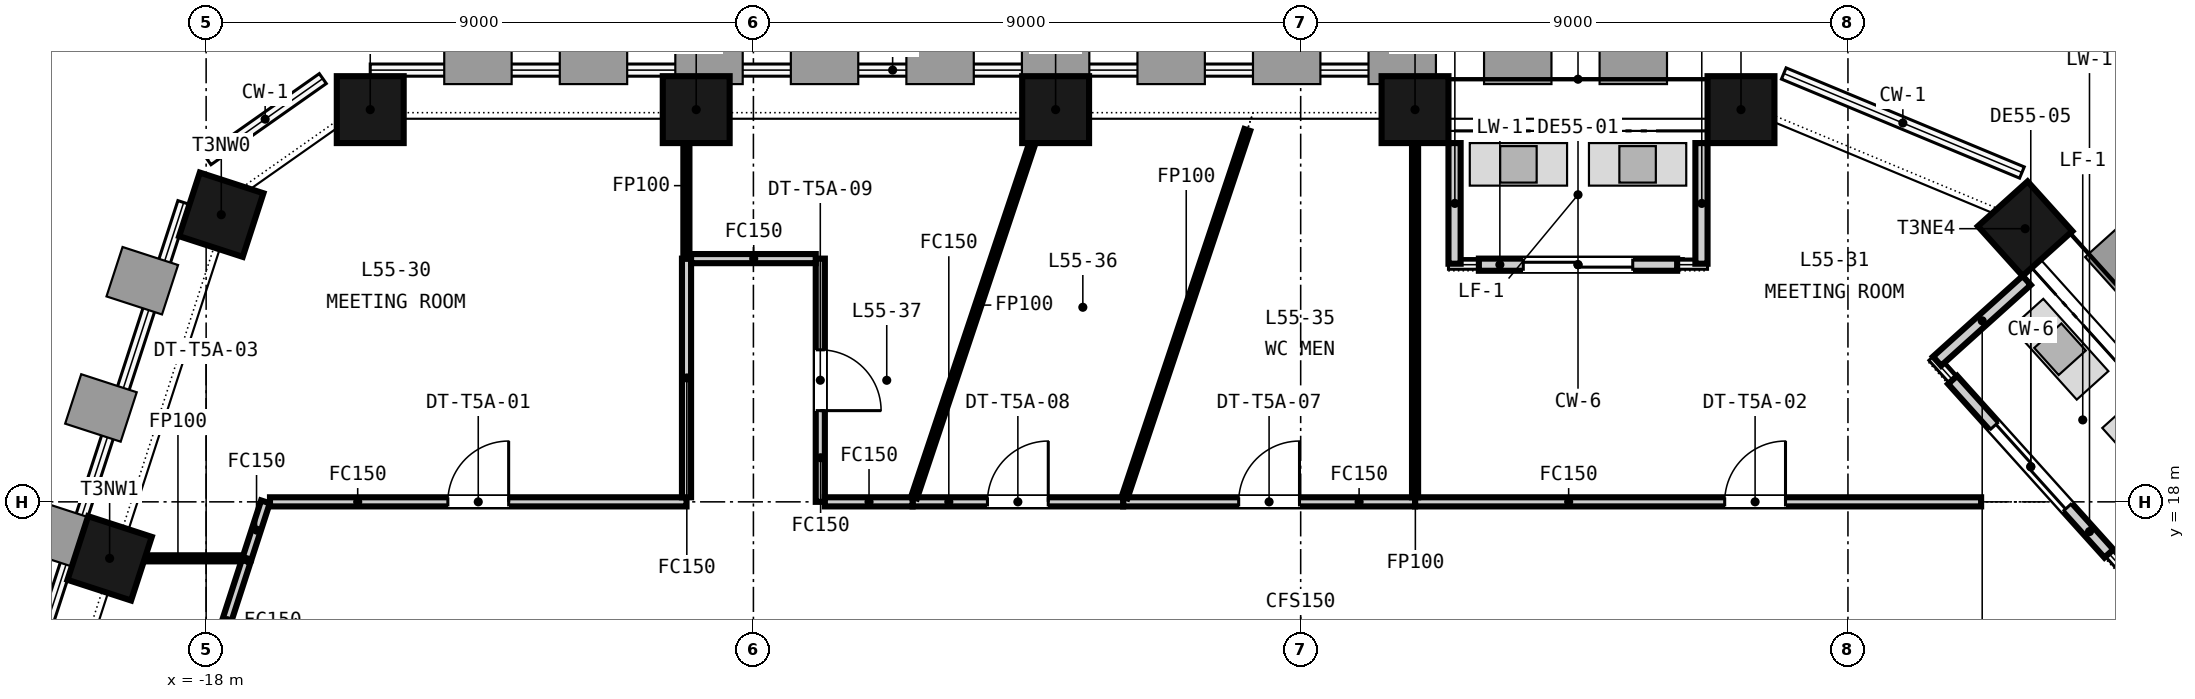
"""IFC4 building model, lengths in metres.
Left out: names, types, materials, properties, quantities, classifications, styles, units other than length and angle.
Written with IfcOpenShell. Run it as: python <this file> out.ifc"""

import sys

from ifc_helpers import new_model, si_unit, direction, frame, frame_2d, origin, origin_2d, place, context, subcontext, project, spatial, rectangle, extrude, element, fill, save


model = new_model("IFC4")
c1 = context("Model", 3, precision=1e-05, world=origin(), true_north=direction((0.0, 1.0)))
c2 = subcontext(c1, "Body", "Model", "MODEL_VIEW")
j1 = project(units=[si_unit("LENGTHUNIT", "METRE"), si_unit("PLANEANGLEUNIT", "RADIAN")], contexts=[c1])
p1 = place(None, origin())
s1 = spatial("IfcSite", under=j1, at=p1, CompositionType="ELEMENT")
p2 = place(p1, origin())
s2 = spatial("IfcBuilding", under=s1, at=p2, CompositionType="ELEMENT")
p3 = place(p2, frame((0.0, 0.0, 219.95)))
s3 = spatial("IfcBuildingStorey", under=s2, at=p3, CompositionType="ELEMENT", Elevation=219.95)
for number, where, z_axis, x_axis in (
    (1, (7.241, 24.45, -0.15), (0.0, 0.0, 1.0), (-1.0, 0.0, 0.0)),
    (2, (1.881, 24.45, -0.15), (0.0, 0.0, 1.0), (-1.0, 0.0, 0.0)),
    (3, (-4.03, 24.45, -0.15), (0.0, 0.0, 1.0), (-1.0, 0.0, 0.0)),
    (4, (-9.941, 24.45, -0.15), (0.0, 0.0, 1.0), (-1.0, 0.0, 0.0)),
    (5, (-15.301, 24.45, -0.15), (0.0, 0.0, 1.0), (-1.0, 0.0, 0.0)),
    (6, (-17.751, 22.722, -0.15), (0.0, 0.0, 1.0), (-0.309, -0.951, 0.0)),
    (7, (-19.587, 17.071, -0.15), (0.0, 0.0, 1.0), (-0.309, -0.951, 0.0)),
    (8, (11.914, 22.492, -0.15), (0.0, 0.0, 1.0), (-0.669, 0.743, 0.0)),
):
    element("IfcColumn", number, at=place(p3, frame(where, z_axis=z_axis, x_axis=x_axis)), inside=s3, PredefinedType="COLUMN", context=c2, shape_type="SweptSolid", body=[
        extrude(rectangle(XDim=1.1, YDim=1.1, at=origin_2d()), origin(), (0.0, 0.0, 1.0), 3.65),
    ])
p4 = place(p3, frame((6.191, 21.9, 0.0), z_axis=(0.0, 0.0, 1.0), x_axis=(-1.0, 0.0, 0.0)))
e9 = element("IfcWall", 9, at=p4, inside=s3, PredefinedType="SOLIDWALL", context=c2, shape_type="SweptSolid", body=[
    extrude(rectangle(XDim=3.261, YDim=0.2, at=frame_2d((1.63, 0.0))), origin(), (0.0, 0.0, 1.0), 2.897),
])
p5 = place(p4, frame((0.73, 0.0, 0.0)))
e10 = element("IfcOpeningElement", 10, at=p5, cuts=e9, PredefinedType="OPENING", context=c2, shape_type="SweptSolid", body=[
    extrude(rectangle(XDim=1.8, YDim=2.4, at=frame_2d((0.9, 1.2))), frame((0.0, 0.11, 0.0), z_axis=(0.0, -1.0, 0.0), x_axis=(1.0, 0.0, 0.0)), (0.0, 0.0, 1.0), 0.22),
])
for number, where, z_axis, x_axis in (
    (11, (6.591, 23.9, 0.0), (0.0, 0.0, 1.0), (0.0, -1.0, 0.0)),
    (12, (2.531, 23.9, 0.0), (0.0, 0.0, 1.0), (0.0, -1.0, 0.0)),
):
    element("IfcWall", number, at=place(p3, frame(where, z_axis=z_axis, x_axis=x_axis)), inside=s3, PredefinedType="SOLIDWALL", context=c2, shape_type="SweptSolid", body=[
        extrude(rectangle(XDim=1.984, YDim=0.2, at=frame_2d((0.992, 0.0))), origin(), (0.0, 0.0, 1.0), 3.05),
    ])
p6 = place(p3, frame((13.292, 17.15, 0.0), z_axis=(0.0, 0.0, 1.0), x_axis=(-0.66915429884, 0.743123491988, 0.0)))
e13 = element("IfcWall", 13, at=p6, inside=s3, PredefinedType="SOLIDWALL", context=c2, shape_type="SweptSolid", body=[
    extrude(rectangle(XDim=3.842, YDim=0.2, at=frame_2d((1.921, 0.0))), origin(), (0.0, 0.0, 1.0), 3.05),
])
p7 = place(p6, frame((1.021, 0.0, 0.0)))
e14 = element("IfcOpeningElement", 14, at=p7, cuts=e13, PredefinedType="OPENING", context=c2, shape_type="SweptSolid", body=[
    extrude(rectangle(XDim=1.8, YDim=2.4, at=frame_2d((0.9, 1.2))), frame((0.0, 0.11, 0.0), z_axis=(0.0, -1.0, 0.0), x_axis=(1.0, 0.0, 0.0)), (0.0, 0.0, 1.0), 0.22),
])
p8 = place(p3, frame((11.94, 21.641, 0.0), z_axis=(0.0, 0.0, 1.0), x_axis=(-0.743171771917, -0.669100678094, 0.0)))
e15 = element("IfcWall", 15, at=p8, inside=s3, PredefinedType="SOLIDWALL", context=c2, shape_type="SweptSolid", body=[
    extrude(rectangle(XDim=1.984, YDim=0.2, at=frame_2d((0.992, 0.0))), origin(), (0.0, 0.0, 1.0), 3.05),
])
p9 = place(p3, frame((-7.9, 22.0, 0.0), z_axis=(0.0, 0.0, 1.0), x_axis=(0.0, -1.0, 0.0)))
e16 = element("IfcWall", 16, at=p9, inside=s3, PredefinedType="PARTITIONING", context=c2, shape_type="SweptSolid", body=[
    extrude(rectangle(XDim=4.0, YDim=0.15, at=frame_2d((2.0, 0.0))), origin(), (0.0, 0.0, 1.0), 2.751),
])
p10 = place(p9, frame((1.5, 0.0, 0.0)))
e17 = element("IfcOpeningElement", 17, at=p10, cuts=e16, PredefinedType="OPENING", context=c2, shape_type="SweptSolid", body=[
    extrude(rectangle(XDim=1.0, YDim=2.1, at=frame_2d((0.5, 1.05))), frame((0.0, 0.085, 0.0), z_axis=(0.0, -1.0, 0.0), x_axis=(1.0, 0.0, 0.0)), (0.0, 0.0, 1.0), 0.17),
])
p11 = place(p3, frame((-17.327, 17.071, 0.0), z_axis=(0.0, 0.0, 1.0), x_axis=(0.309170843074, 0.951006514064, 0.0)))
e18 = element("IfcWall", 18, at=p11, inside=s3, PredefinedType="PARTITIONING", context=c2, shape_type="SweptSolid", body=[
    extrude(rectangle(XDim=0.977, YDim=0.15, at=frame_2d((0.488, 0.0))), origin(), (0.0, 0.0, 1.0), 2.751),
])
p12 = place(p3, frame((-16.95, 18.0, 0.0), z_axis=(0.0, 0.0, 1.0), x_axis=(1.0, 0.0, 0.0)))
e19 = element("IfcWall", 19, at=p12, inside=s3, PredefinedType="PARTITIONING", context=c2, shape_type="SweptSolid", body=[
    extrude(rectangle(XDim=6.85, YDim=0.15, at=frame_2d((3.425, 0.0))), origin(), (0.0, 0.0, 1.0), 2.751),
])
p13 = place(p12, frame((2.925, 0.0, 0.0)))
e20 = element("IfcOpeningElement", 20, at=p13, cuts=e19, PredefinedType="OPENING", context=c2, shape_type="SweptSolid", body=[
    extrude(rectangle(XDim=1.0, YDim=2.1, at=frame_2d((0.5, 1.05))), frame((0.0, 0.085, 0.0), z_axis=(0.0, -1.0, 0.0), x_axis=(1.0, 0.0, 0.0)), (0.0, 0.0, 1.0), 0.17),
])
p14 = place(p3, frame((-10.1, 18.075, 0.0), z_axis=(0.0, 0.0, 1.0), x_axis=(0.0, 1.0, 0.0)))
e21 = element("IfcWall", 21, at=p14, inside=s3, PredefinedType="PARTITIONING", context=c2, shape_type="SweptSolid", body=[
    extrude(rectangle(XDim=3.925, YDim=0.15, at=frame_2d((1.962, 0.0))), origin(), (0.0, 0.0, 1.0), 2.751),
])
p15 = place(p3, frame((-19.535, 17.071, 0.0), z_axis=(0.0, 0.0, 1.0), x_axis=(1.0, 0.0, 0.0)))
e22 = element("IfcWall", 22, at=p15, inside=s3, PredefinedType="PARTITIONING", context=c2, shape_type="SweptSolid", body=[
    extrude(rectangle(XDim=2.133, YDim=0.1, at=frame_2d((1.066, 0.0))), origin(), (0.0, 0.0, 1.0), 2.751),
])
p16 = place(p3, frame((-10.102, 22.0, 0.0), z_axis=(0.0, 0.0, 1.0), x_axis=(0.0, 1.0, 0.0)))
e23 = element("IfcWall", 23, at=p16, inside=s3, PredefinedType="PARTITIONING", context=c2, shape_type="SweptSolid", body=[
    extrude(rectangle(XDim=2.4, YDim=0.1, at=frame_2d((1.2, 0.0))), origin(), (0.0, 0.0, 1.0), 2.751),
])
p17 = place(p3, frame((1.881, 18.0, 0.0), z_axis=(0.0, 0.0, 1.0), x_axis=(1.0, 0.0, 0.0)))
e24 = element("IfcWall", 24, at=p17, inside=s3, PredefinedType="PARTITIONING", context=c2, shape_type="SweptSolid", body=[
    extrude(rectangle(XDim=9.309, YDim=0.15, at=frame_2d((4.655, 0.0))), origin(), (0.0, 0.0, 1.0), 2.751),
])
p18 = place(p17, frame((5.092, 0.0, 0.0)))
e25 = element("IfcOpeningElement", 25, at=p18, cuts=e24, PredefinedType="OPENING", context=c2, shape_type="SweptSolid", body=[
    extrude(rectangle(XDim=1.0, YDim=2.1, at=frame_2d((0.5, 1.05))), frame((0.0, 0.085, 0.0), z_axis=(0.0, -1.0, 0.0), x_axis=(1.0, 0.0, 0.0)), (0.0, 0.0, 1.0), 0.17),
])
p19 = place(p3, frame((-17.977, 15.069, 0.0), z_axis=(0.0, 0.0, 1.0), x_axis=(0.308838863498, 0.951114376084, 0.0)))
e26 = element("IfcWall", 26, at=p19, inside=s3, PredefinedType="PARTITIONING", context=c2, shape_type="SweptSolid", body=[
    extrude(rectangle(XDim=2.054, YDim=0.15, at=frame_2d((1.027, 0.0))), origin(), (0.0, 0.0, 1.0), 2.751),
])
p20 = place(p3, frame((-2.92, 18.0, 0.0), z_axis=(0.0, 0.0, 1.0), x_axis=(1.0, 0.0, 0.0)))
e27 = element("IfcWall", 27, at=p20, inside=s3, PredefinedType="PARTITIONING", context=c2, shape_type="SweptSolid", body=[
    extrude(rectangle(XDim=4.801, YDim=0.15, at=frame_2d((2.4, 0.0))), origin(), (0.0, 0.0, 1.0), 2.751),
])
p21 = place(p20, frame((1.9, 0.0, 0.0)))
e28 = element("IfcOpeningElement", 28, at=p21, cuts=e27, PredefinedType="OPENING", context=c2, shape_type="SweptSolid", body=[
    extrude(rectangle(XDim=1.0, YDim=2.1, at=frame_2d((0.5, 1.05))), frame((0.0, 0.085, 0.0), z_axis=(0.0, -1.0, 0.0), x_axis=(1.0, 0.0, 0.0)), (0.0, 0.0, 1.0), 0.17),
])
p22 = place(p3, frame((1.881, 18.075, 0.0), z_axis=(0.0, 0.0, 1.0), x_axis=(0.0, 1.0, 0.0)))
e29 = element("IfcWall", 29, at=p22, inside=s3, PredefinedType="PARTITIONING", context=c2, shape_type="SweptSolid", body=[
    extrude(rectangle(XDim=6.325, YDim=0.1, at=frame_2d((3.163, 0.0))), origin(), (0.0, 0.0, 1.0), 2.751),
])
p23 = place(p3, frame((-6.382, 18.0, 0.0), z_axis=(0.0, 0.0, 1.0), x_axis=(1.0, 0.0, 0.0)))
e30 = element("IfcWall", 30, at=p23, inside=s3, PredefinedType="PARTITIONING", context=c2, shape_type="SweptSolid", body=[
    extrude(rectangle(XDim=3.462, YDim=0.15, at=frame_2d((1.731, 0.0))), origin(), (0.0, 0.0, 1.0), 2.751),
])
p24 = place(p23, frame((1.231, 0.0, 0.0)))
e31 = element("IfcOpeningElement", 31, at=p24, cuts=e30, PredefinedType="OPENING", context=c2, shape_type="SweptSolid", body=[
    extrude(rectangle(XDim=1.0, YDim=2.1, at=frame_2d((0.5, 1.05))), frame((0.0, 0.085, 0.0), z_axis=(0.0, -1.0, 0.0), x_axis=(1.0, 0.0, 0.0)), (0.0, 0.0, 1.0), 0.17),
])
p25 = place(p3, frame((-2.896, 18.071, 0.0), z_axis=(0.0, 0.0, 1.0), x_axis=(0.316721942661, 0.948518429466, 0.0)))
e32 = element("IfcWall", 32, at=p25, inside=s3, PredefinedType="PARTITIONING", context=c2, shape_type="SweptSolid", body=[
    extrude(rectangle(XDim=6.373, YDim=0.1, at=frame_2d((3.186, 0.0))), origin(), (0.0, 0.0, 1.0), 2.751),
])
p26 = place(p3, frame((-10.025, 22.0, 0.0), z_axis=(0.0, 0.0, 1.0), x_axis=(1.0, 0.0, 0.0)))
e33 = element("IfcWall", 33, at=p26, inside=s3, PredefinedType="PARTITIONING", context=c2, shape_type="SweptSolid", body=[
    extrude(rectangle(XDim=2.05, YDim=0.15, at=frame_2d((1.025, 0.0))), origin(), (0.0, 0.0, 1.0), 2.751),
])
p27 = place(p3, frame((-7.825, 18.0, 0.0), z_axis=(0.0, 0.0, 1.0), x_axis=(1.0, 0.0, 0.0)))
e34 = element("IfcWall", 34, at=p27, inside=s3, PredefinedType="PARTITIONING", context=c2, shape_type="SweptSolid", body=[
    extrude(rectangle(XDim=1.443, YDim=0.15, at=frame_2d((0.721, 0.0))), origin(), (0.0, 0.0, 1.0), 2.751),
])
p28 = place(p3, frame((-6.358, 18.071, 0.0), z_axis=(0.0, 0.0, 1.0), x_axis=(0.316688766046, 0.9485295069, 0.0)))
e35 = element("IfcWall", 35, at=p28, inside=s3, PredefinedType="PARTITIONING", context=c2, shape_type="SweptSolid", body=[
    extrude(rectangle(XDim=6.672, YDim=0.1, at=frame_2d((3.336, 0.0))), origin(), (0.0, 0.0, 1.0), 2.751),
])
p29 = place(p5, origin())
e36 = element("IfcDoor", 36, at=p29, inside=s3, OperationType="SINGLE_SWING_LEFT", PredefinedType="DOOR", context=c2, shape_type="SweptSolid", body=[
    extrude(rectangle(XDim=1.8, YDim=2.4, at=frame_2d((0.9, 1.2))), frame((0.0, 0.025, 0.0), z_axis=(0.0, -1.0, 0.0), x_axis=(1.0, 0.0, 0.0)), (0.0, 0.0, 1.0), 0.05),
])
fill(e10, e36)
p30 = place(p7, origin())
e37 = element("IfcDoor", 37, at=p30, inside=s3, OperationType="SINGLE_SWING_LEFT", PredefinedType="DOOR", context=c2, shape_type="SweptSolid", body=[
    extrude(rectangle(XDim=1.8, YDim=2.4, at=frame_2d((0.9, 1.2))), frame((0.0, 0.025, 0.0), z_axis=(0.0, -1.0, 0.0), x_axis=(1.0, 0.0, 0.0)), (0.0, 0.0, 1.0), 0.05),
])
fill(e14, e37)
p31 = place(p13, origin())
e38 = element("IfcDoor", 38, at=p31, inside=s3, OperationType="SINGLE_SWING_RIGHT", PredefinedType="DOOR", context=c2, shape_type="SweptSolid", body=[
    extrude(rectangle(XDim=1.0, YDim=2.1, at=frame_2d((0.5, 1.05))), frame((0.0, 0.025, 0.0), z_axis=(0.0, -1.0, 0.0), x_axis=(1.0, 0.0, 0.0)), (0.0, 0.0, 1.0), 0.05),
])
fill(e20, e38)
p32 = place(p18, origin())
e39 = element("IfcDoor", 39, at=p32, inside=s3, OperationType="SINGLE_SWING_RIGHT", PredefinedType="DOOR", context=c2, shape_type="SweptSolid", body=[
    extrude(rectangle(XDim=1.0, YDim=2.1, at=frame_2d((0.5, 1.05))), frame((0.0, 0.025, 0.0), z_axis=(0.0, -1.0, 0.0), x_axis=(1.0, 0.0, 0.0)), (0.0, 0.0, 1.0), 0.05),
])
fill(e25, e39)
p33 = place(p21, origin())
e40 = element("IfcDoor", 40, at=p33, inside=s3, OperationType="SINGLE_SWING_RIGHT", PredefinedType="DOOR", context=c2, shape_type="SweptSolid", body=[
    extrude(rectangle(XDim=1.0, YDim=2.1, at=frame_2d((0.5, 1.05))), frame((0.0, 0.025, 0.0), z_axis=(0.0, -1.0, 0.0), x_axis=(1.0, 0.0, 0.0)), (0.0, 0.0, 1.0), 0.05),
])
fill(e28, e40)
p34 = place(p24, origin())
e41 = element("IfcDoor", 41, at=p34, inside=s3, OperationType="SINGLE_SWING_RIGHT", PredefinedType="DOOR", context=c2, shape_type="SweptSolid", body=[
    extrude(rectangle(XDim=1.0, YDim=2.1, at=frame_2d((0.5, 1.05))), frame((0.0, 0.025, 0.0), z_axis=(0.0, -1.0, 0.0), x_axis=(1.0, 0.0, 0.0)), (0.0, 0.0, 1.0), 0.05),
])
fill(e31, e41)
p35 = place(p10, origin())
e42 = element("IfcDoor", 42, at=p35, inside=s3, OperationType="SINGLE_SWING_RIGHT", PredefinedType="DOOR", context=c2, shape_type="SweptSolid", body=[
    extrude(rectangle(XDim=1.0, YDim=2.1, at=frame_2d((0.5, 1.05))), frame((0.0, 0.025, 0.0), z_axis=(0.0, -1.0, 0.0), x_axis=(1.0, 0.0, 0.0)), (0.0, 0.0, 1.0), 0.05),
])
fill(e17, e42)
save(model, sys.argv[1])
